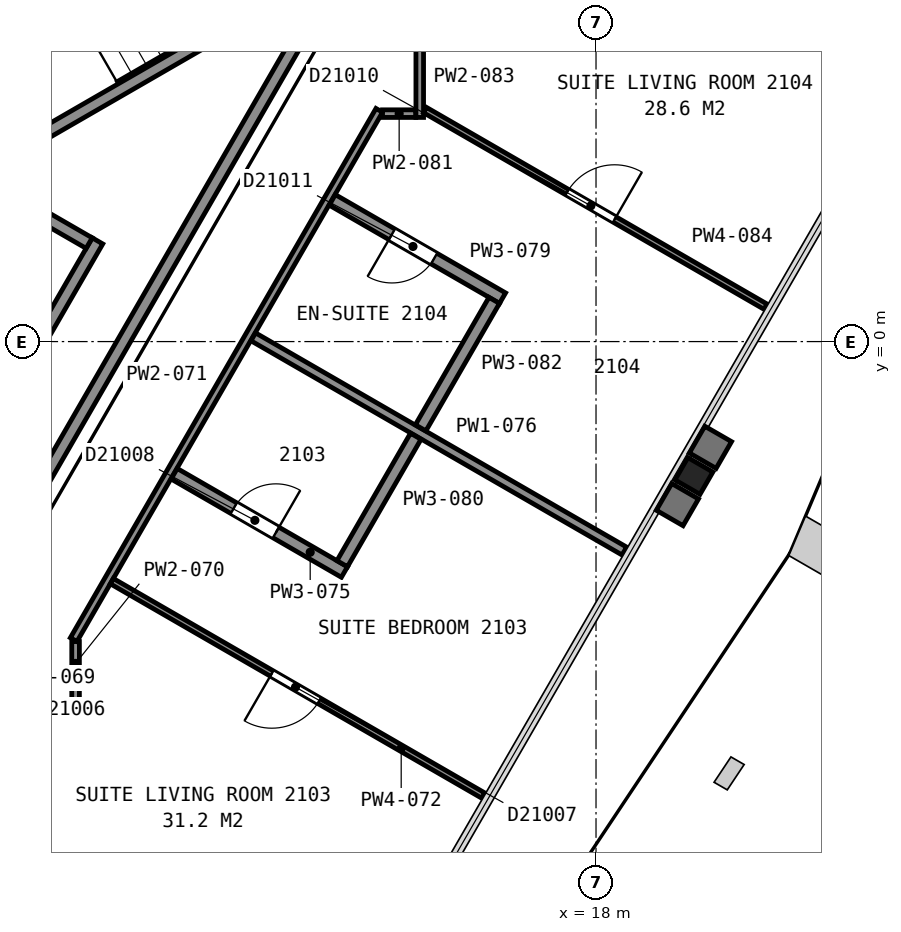
"""IFC4 building model, lengths in metres.
Left out: names, types, materials, properties, quantities, classifications, styles, units other than length and angle.
Written with IfcOpenShell. Run it as: python <this file> out.ifc"""

import sys

from ifc_helpers import new_model, si_unit, direction, frame, frame_2d, origin, origin_2d, place, context, subcontext, project, spatial, rectangle, i_section, extrude, element, fill, save


model = new_model("IFC4")
c1 = context("Model", 3, precision=1e-05, world=origin(), true_north=direction((0.0, 1.0)))
c2 = subcontext(c1, "Body", "Model", "MODEL_VIEW")
j1 = project(units=[si_unit("LENGTHUNIT", "METRE"), si_unit("PLANEANGLEUNIT", "RADIAN")], contexts=[c1])
p1 = place(None, origin())
s1 = spatial("IfcSite", under=j1, at=p1, CompositionType="ELEMENT")
p2 = place(p1, origin())
s2 = spatial("IfcBuilding", under=s1, at=p2, CompositionType="ELEMENT")
p3 = place(p2, frame((0.0, 0.0, 92.8)))
s3 = spatial("IfcBuildingStorey", under=s2, at=p3, CompositionType="ELEMENT", Elevation=92.8)
p4 = place(p3, frame((19.61, -2.21, 0.0), z_axis=(0.0, 0.0, 1.0), x_axis=(-0.5, -0.866025403784, 0.0)))
e1 = element("IfcColumn", 1, at=p4, inside=s3, PredefinedType="COLUMN", context=c2, shape_type="SweptSolid", body=[
    extrude(i_section(OverallWidth=0.424, OverallDepth=0.475, WebThickness=0.048, FlangeThickness=0.077, FilletRadius=0.015, at=origin_2d()), origin(), (0.0, 0.0, 1.0), 3.6),
])
p5 = place(p3, frame((7.678, 2.701, 0.0), z_axis=(0.0, 0.0, 1.0), x_axis=(0.866026010844, 0.49999894854, 0.0)))
e2 = element("IfcWall", 2, at=p5, inside=s3, PredefinedType="PARTITIONING", context=c2, shape_type="SweptSolid", body=[
    extrude(rectangle(XDim=12.0, YDim=0.2, at=frame_2d((6.0, 0.0))), origin(), (0.0, 0.0, 1.0), 3.35),
])
p6 = place(p3, frame((7.451, -2.414, 0.0), z_axis=(0.0, 0.0, 1.0), x_axis=(0.500016218704, 0.866016039709, 0.0)))
e3 = element("IfcWall", 3, at=p6, inside=s3, PredefinedType="PARTITIONING", context=c2, shape_type="SweptSolid", body=[
    extrude(rectangle(XDim=4.7, YDim=0.2, at=frame_2d((2.35, 0.0))), origin(), (0.0, 0.0, 1.0), 3.6),
])
p7 = place(p3, frame((9.665, 1.62, 0.0), z_axis=(0.0, 0.0, 1.0), x_axis=(-0.866002029911, 0.500040482552, 0.0)))
e4 = element("IfcWall", 4, at=p7, inside=s3, PredefinedType="PARTITIONING", context=c2, shape_type="SweptSolid", body=[
    extrude(rectangle(XDim=1.75, YDim=0.2, at=frame_2d((0.875, 0.0))), origin(), (0.0, 0.0, 1.0), 3.6),
])
p8 = place(p3, frame((8.492, -3.012, 0.0), z_axis=(0.0, 0.0, 1.0), x_axis=(0.499972957231, 0.866041016371, 0.0)))
e5 = element("IfcWall", 5, at=p8, inside=s3, PredefinedType="PARTITIONING", context=c2, shape_type="SweptSolid", body=[
    extrude(rectangle(XDim=10.349, YDim=0.2, at=frame_2d((5.174, 0.0))), origin(), (0.0, 0.0, 1.0), 3.35),
])
p9 = place(p3, frame((7.72, -7.963, 0.0), z_axis=(0.0, 0.0, 1.0), x_axis=(0.865980767462, -0.500077304409, 0.0)))
e6 = element("IfcWall", 6, at=p9, inside=s3, PredefinedType="PARTITIONING", context=c2, shape_type="SweptSolid", body=[
    extrude(rectangle(XDim=7.047, YDim=0.15, at=frame_2d((3.524, 0.0))), origin(), (0.0, 0.0, 1.0), 2.613),
])
p10 = place(p3, frame((8.82, -6.071, 0.0), z_axis=(0.0, 0.0, 1.0), x_axis=(1.0, 0.0, 0.0)))
e7 = element("IfcWall", 7, at=p10, inside=s3, PredefinedType="PARTITIONING", context=c2, shape_type="SweptSolid", body=[
    extrude(rectangle(XDim=0.556, YDim=0.125, at=frame_2d((0.278, 0.0))), origin(), (0.0, 0.0, 1.0), 2.613),
])
p11 = place(p3, frame((9.441, -6.134, 0.0), z_axis=(0.0, 0.0, 1.0), x_axis=(0.0, 1.0, 0.0)))
e8 = element("IfcWall", 8, at=p11, inside=s3, PredefinedType="PARTITIONING", context=c2, shape_type="SweptSolid", body=[
    extrude(rectangle(XDim=1.2, YDim=0.125, at=frame_2d((0.6, 0.0))), origin(), (0.0, 0.0, 1.0), 2.613),
])
p12 = place(p3, frame((9.41, -4.902, 0.0), z_axis=(0.0, 0.0, 1.0), x_axis=(0.499971244726, 0.866042005013, 0.0)))
e9 = element("IfcWall", 9, at=p12, inside=s3, PredefinedType="PARTITIONING", context=c2, shape_type="SweptSolid", body=[
    extrude(rectangle(XDim=10.052, YDim=0.125, at=frame_2d((5.026, 0.0))), origin(), (0.0, 0.0, 1.0), 2.613),
])
p13 = place(p3, frame((10.037, -3.94, 0.0), z_axis=(0.0, 0.0, 1.0), x_axis=(0.866063951978, -0.499933226626, 0.0)))
e10 = element("IfcWall", 10, at=p13, inside=s3, PredefinedType="PARTITIONING", context=c2, shape_type="SweptSolid", body=[
    extrude(rectangle(XDim=7.052, YDim=0.1, at=frame_2d((3.526, 0.0))), origin(), (0.0, 0.0, 1.0), 2.613),
])
p14 = place(p13, frame((3.038, 0.0, 0.0)))
e11 = element("IfcOpeningElement", 11, at=p14, cuts=e10, PredefinedType="OPENING", context=c2, shape_type="SweptSolid", body=[
    extrude(rectangle(XDim=0.9, YDim=2.1, at=frame_2d((0.45, 1.05))), frame((0.0, 0.06, 0.0), z_axis=(0.0, -1.0, 0.0), x_axis=(1.0, 0.0, 0.0)), (0.0, 0.0, 1.0), 0.12),
])
p15 = place(p3, frame((11.062, -2.174, 0.0), z_axis=(0.0, 0.0, 1.0), x_axis=(0.866078705744, -0.499907666931, 0.0)))
e12 = element("IfcWall", 12, at=p15, inside=s3, PredefinedType="PARTITIONING", context=c2, shape_type="SweptSolid", body=[
    extrude(rectangle(XDim=3.233, YDim=0.2, at=frame_2d((1.616, 0.0))), origin(), (0.0, 0.0, 1.0), 2.613),
])
p16 = place(p15, frame((1.133, 0.0, 0.0)))
e13 = element("IfcOpeningElement", 13, at=p16, cuts=e12, PredefinedType="OPENING", context=c2, shape_type="SweptSolid", body=[
    extrude(rectangle(XDim=0.8, YDim=2.1, at=frame_2d((0.4, 1.05))), frame((0.0, 0.11, 0.0), z_axis=(0.0, -1.0, 0.0), x_axis=(1.0, 0.0, 0.0)), (0.0, 0.0, 1.0), 0.22),
])
p17 = place(p3, frame((12.363, 0.078, 0.0), z_axis=(0.0, 0.0, 1.0), x_axis=(0.86605175433, -0.499954356739, 0.0)))
e14 = element("IfcWall", 14, at=p17, inside=s3, PredefinedType="PARTITIONING", context=c2, shape_type="SweptSolid", body=[
    extrude(rectangle(XDim=7.048, YDim=0.15, at=frame_2d((3.524, 0.0))), origin(), (0.0, 0.0, 1.0), 2.613),
])
p18 = place(p3, frame((16.463, 0.714, 0.0), z_axis=(0.0, 0.0, 1.0), x_axis=(-0.86609757561, 0.499874973892, 0.0)))
e15 = element("IfcWall", 15, at=p18, inside=s3, PredefinedType="PARTITIONING", context=c2, shape_type="SweptSolid", body=[
    extrude(rectangle(XDim=3.233, YDim=0.2, at=frame_2d((1.617, 0.0))), origin(), (0.0, 0.0, 1.0), 2.613),
])
p19 = place(p18, frame((1.301, 0.0, 0.0)))
e16 = element("IfcOpeningElement", 16, at=p19, cuts=e15, PredefinedType="OPENING", context=c2, shape_type="SweptSolid", body=[
    extrude(rectangle(XDim=0.8, YDim=2.1, at=frame_2d((0.4, 1.05))), frame((0.0, 0.11, 0.0), z_axis=(0.0, -1.0, 0.0), x_axis=(1.0, 0.0, 0.0)), (0.0, 0.0, 1.0), 0.22),
])
p20 = place(p3, frame((13.826, -3.653, 0.0), z_axis=(0.0, 0.0, 1.0), x_axis=(0.499719542643, 0.866187265377, 0.0)))
e17 = element("IfcWall", 17, at=p20, inside=s3, PredefinedType="PARTITIONING", context=c2, shape_type="SweptSolid", body=[
    extrude(rectangle(XDim=2.42, YDim=0.2, at=frame_2d((1.21, 0.0))), origin(), (0.0, 0.0, 1.0), 2.613),
])
p21 = place(p3, frame((14.489, 3.749, 0.0), z_axis=(0.0, 0.0, 1.0), x_axis=(1.0, 0.0, 0.0)))
e18 = element("IfcWall", 18, at=p21, inside=s3, PredefinedType="PARTITIONING", context=c2, shape_type="SweptSolid", body=[
    extrude(rectangle(XDim=0.547, YDim=0.125, at=frame_2d((0.273, 0.0))), origin(), (0.0, 0.0, 1.0), 2.613),
])
p22 = place(p3, frame((15.115, -1.419, 0.0), z_axis=(0.0, 0.0, 1.0), x_axis=(0.50002218001, 0.866012597771, 0.0)))
e19 = element("IfcWall", 19, at=p22, inside=s3, PredefinedType="PARTITIONING", context=c2, shape_type="SweptSolid", body=[
    extrude(rectangle(XDim=2.421, YDim=0.2, at=frame_2d((1.21, 0.0))), origin(), (0.0, 0.0, 1.0), 2.613),
])
p23 = place(p3, frame((15.101, 3.687, 0.0), z_axis=(0.0, 0.0, 1.0), x_axis=(0.0, 1.0, 0.0)))
e20 = element("IfcWall", 20, at=p23, inside=s3, PredefinedType="PARTITIONING", context=c2, shape_type="SweptSolid", body=[
    extrude(rectangle(XDim=1.331, YDim=0.125, at=frame_2d((0.666, 0.0))), origin(), (0.0, 0.0, 1.0), 2.613),
])
p24 = place(p3, frame((20.787, 0.575, 0.0), z_axis=(0.0, 0.0, 1.0), x_axis=(-0.866012632051, 0.500022120638, 0.0)))
e21 = element("IfcWall", 21, at=p24, inside=s3, PredefinedType="PARTITIONING", context=c2, shape_type="SweptSolid", body=[
    extrude(rectangle(XDim=6.465, YDim=0.1, at=frame_2d((3.232, 0.0))), origin(), (0.0, 0.0, 1.0), 2.613),
])
p25 = place(p24, frame((2.866, 0.0, 0.0)))
e22 = element("IfcOpeningElement", 22, at=p25, cuts=e21, PredefinedType="OPENING", context=c2, shape_type="SweptSolid", body=[
    extrude(rectangle(XDim=0.9, YDim=2.1, at=frame_2d((0.45, 1.05))), frame((0.0, 0.06, 0.0), z_axis=(0.0, -1.0, 0.0), x_axis=(1.0, 0.0, 0.0)), (0.0, 0.0, 1.0), 0.12),
])
p26 = place(p3, frame((18.866, 7.046, 0.0), z_axis=(0.0, 0.0, 1.0), x_axis=(0.866042025588, -0.499971209087, 0.0)))
e23 = element("IfcWall", 23, at=p26, inside=s3, PredefinedType="PARTITIONING", context=c2, shape_type="SweptSolid", body=[
    extrude(rectangle(XDim=4.899, YDim=0.15, at=frame_2d((2.45, 0.0))), origin(), (0.0, 0.0, 1.0), 2.613),
])
p27 = place(p14, origin())
e24 = element("IfcDoor", 24, at=p27, inside=s3, OperationType="SINGLE_SWING_LEFT", PredefinedType="DOOR", context=c2, shape_type="SweptSolid", body=[
    extrude(rectangle(XDim=0.9, YDim=2.1, at=frame_2d((0.45, 1.05))), frame((0.0, 0.025, 0.0), z_axis=(0.0, -1.0, 0.0), x_axis=(1.0, 0.0, 0.0)), (0.0, 0.0, 1.0), 0.05),
])
fill(e11, e24)
p28 = place(p16, origin())
e25 = element("IfcDoor", 25, at=p28, inside=s3, OperationType="SINGLE_SWING_RIGHT", PredefinedType="DOOR", context=c2, shape_type="SweptSolid", body=[
    extrude(rectangle(XDim=0.8, YDim=2.1, at=frame_2d((0.4, 1.05))), frame((0.0, 0.025, 0.0), z_axis=(0.0, -1.0, 0.0), x_axis=(1.0, 0.0, 0.0)), (0.0, 0.0, 1.0), 0.05),
])
fill(e13, e25)
p29 = place(p19, origin())
e26 = element("IfcDoor", 26, at=p29, inside=s3, OperationType="SINGLE_SWING_RIGHT", PredefinedType="DOOR", context=c2, shape_type="SweptSolid", body=[
    extrude(rectangle(XDim=0.8, YDim=2.1, at=frame_2d((0.4, 1.05))), frame((0.0, 0.025, 0.0), z_axis=(0.0, -1.0, 0.0), x_axis=(1.0, 0.0, 0.0)), (0.0, 0.0, 1.0), 0.05),
])
fill(e16, e26)
p30 = place(p25, origin())
e27 = element("IfcDoor", 27, at=p30, inside=s3, OperationType="SINGLE_SWING_LEFT", PredefinedType="DOOR", context=c2, shape_type="SweptSolid", body=[
    extrude(rectangle(XDim=0.9, YDim=2.1, at=frame_2d((0.45, 1.05))), frame((0.0, 0.025, 0.0), z_axis=(0.0, -1.0, 0.0), x_axis=(1.0, 0.0, 0.0)), (0.0, 0.0, 1.0), 0.05),
])
fill(e22, e27)
save(model, sys.argv[1])
